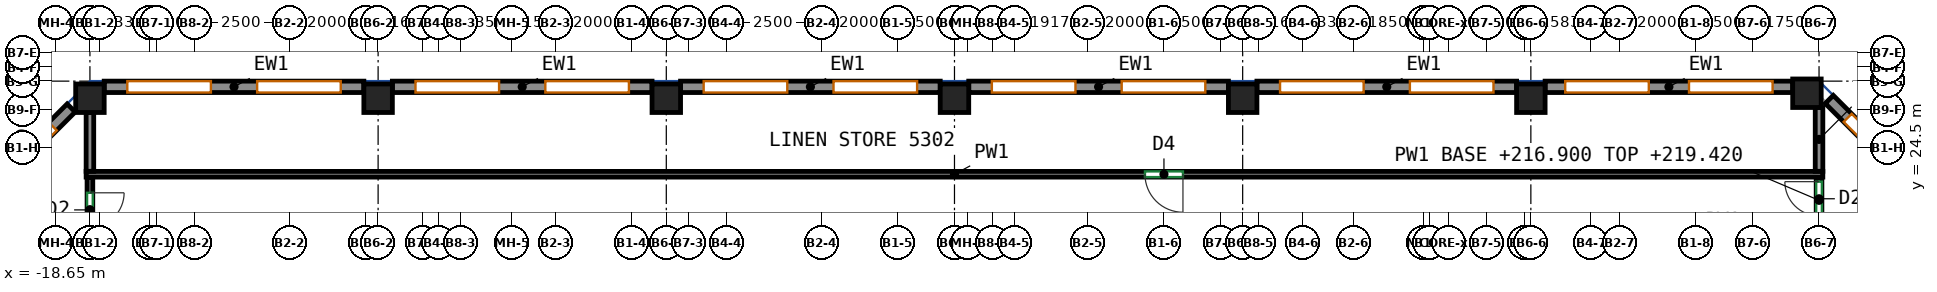
"""IFC4 building model, lengths in metres.
Left out: names, types, materials, properties, quantities, classifications, styles, units other than length and angle.
Written with IfcOpenShell. Run it as: python <this file> out.ifc"""

import sys

from ifc_helpers import new_model, si_unit, direction, frame, frame_2d, origin, origin_2d, place, context, subcontext, project, spatial, rectangle, extrude, source, transform, mapped, element, fill, save


model = new_model("IFC4")
c1 = context("Model", 3, precision=1e-05, world=origin(), true_north=direction((0.0, 1.0)))
c2 = subcontext(c1, "Body", "Model", "MODEL_VIEW")
j1 = project(units=[si_unit("LENGTHUNIT", "METRE"), si_unit("PLANEANGLEUNIT", "RADIAN")], contexts=[c1])
p1 = place(None, origin())
s1 = spatial("IfcSite", under=j1, at=p1, CompositionType="ELEMENT")
p2 = place(p1, origin())
s2 = spatial("IfcBuilding", under=s1, at=p2, CompositionType="ELEMENT")
p3 = place(p2, frame((0.0, 0.0, 216.9)))
s3 = spatial("IfcBuildingStorey", under=s2, at=p3, CompositionType="ELEMENT", Elevation=216.9)
m1 = source(origin(), c2, "Body", "SweptSolid", [
    extrude(rectangle(XDim=0.75, YDim=0.75, at=origin_2d()), origin(), (0.0, 0.0, 1.0), 3.12),
])
for number, where, z_axis, x_axis in (
    (1, (-17.75, 25.8, 0.0), (0.0, 0.0, 1.0), (1.0, 0.0, 0.0)),
    (2, (-10.167, 25.8, 0.0), (0.0, 0.0, 1.0), (1.0, 0.0, 0.0)),
    (3, (-2.583, 25.8, 0.0), (0.0, 0.0, 1.0), (1.0, 0.0, 0.0)),
    (4, (5.0, 25.8, 0.0), (0.0, 0.0, 1.0), (1.0, 0.0, 0.0)),
    (5, (12.583, 25.8, 0.0), (0.0, 0.0, 1.0), (1.0, 0.0, 0.0)),
    (6, (20.167, 25.8, 0.0), (0.0, 0.0, 1.0), (1.0, 0.0, 0.0)),
    (7, (27.432, 25.932, 0.0), (0.0, 0.0, 1.0), (1.0, 0.0, 0.0)),
):
    element("IfcColumn", number, at=place(p3, frame(where, z_axis=z_axis, x_axis=x_axis)), inside=s3, PredefinedType="COLUMN", context=c2, shape_type="MappedRepresentation", body=[
        mapped(m1, transform((0.0, 0.0, 0.0))),
    ])
m2 = source(origin(), c2, "Body", "SweptSolid", [
    extrude(rectangle(XDim=3.571, YDim=0.3, at=frame_2d((1.786, 0.0))), origin(), (0.0, 0.0, 1.0), 3.12),
])
p4 = place(p3, frame((30.544, 23.244, 0.0), z_axis=(0.0, 0.0, 1.0), x_axis=(-0.707140964879, 0.707072595841, 0.0)))
e8 = element("IfcWall", 8, at=p4, inside=s3, PredefinedType="SOLIDWALL", context=c2, shape_type="MappedRepresentation", body=[
    mapped(m2, transform((0.0, 0.0, 0.0))),
])
p5 = place(p4, frame((0.686, 0.0, 0.85)))
e9 = element("IfcOpeningElement", 9, at=p5, cuts=e8, PredefinedType="OPENING", context=c2, shape_type="SweptSolid", body=[
    extrude(rectangle(XDim=2.2, YDim=1.95, at=frame_2d((1.1, 0.975))), frame((0.0, 0.16, 0.0), z_axis=(0.0, -1.0, 0.0), x_axis=(1.0, 0.0, 0.0)), (0.0, 0.0, 1.0), 0.32),
])
m3 = source(origin(), c2, "Body", "SweptSolid", [
    extrude(rectangle(XDim=6.515, YDim=0.3, at=frame_2d((3.258, 0.0))), origin(), (0.0, 0.0, 1.0), 3.12),
])
p6 = place(p3, frame((27.057, 26.1, 0.0), z_axis=(0.0, 0.0, 1.0), x_axis=(-1.0, 0.0, 0.0)))
e10 = element("IfcWall", 10, at=p6, inside=s3, PredefinedType="SOLIDWALL", context=c2, shape_type="MappedRepresentation", body=[
    mapped(m3, transform((0.0, 0.0, 0.0))),
])
p7 = place(p6, frame((0.529, 0.0, 0.85)))
e11 = element("IfcOpeningElement", 11, at=p7, cuts=e10, PredefinedType="OPENING", context=c2, shape_type="SweptSolid", body=[
    extrude(rectangle(XDim=2.2, YDim=1.95, at=frame_2d((1.1, 0.975))), frame((0.0, 0.16, 0.0), z_axis=(0.0, -1.0, 0.0), x_axis=(1.0, 0.0, 0.0)), (0.0, 0.0, 1.0), 0.32),
])
p8 = place(p6, frame((3.786, 0.0, 0.85)))
e12 = element("IfcOpeningElement", 12, at=p8, cuts=e10, PredefinedType="OPENING", context=c2, shape_type="SweptSolid", body=[
    extrude(rectangle(XDim=2.2, YDim=1.95, at=frame_2d((1.1, 0.975))), frame((0.0, 0.16, 0.0), z_axis=(0.0, -1.0, 0.0), x_axis=(1.0, 0.0, 0.0)), (0.0, 0.0, 1.0), 0.32),
])
m4 = source(origin(), c2, "Body", "SweptSolid", [
    extrude(rectangle(XDim=6.833, YDim=0.3, at=frame_2d((3.417, 0.0))), origin(), (0.0, 0.0, 1.0), 3.12),
])
p9 = place(p3, frame((19.792, 26.1, 0.0), z_axis=(0.0, 0.0, 1.0), x_axis=(-1.0, 0.0, 0.0)))
e13 = element("IfcWall", 13, at=p9, inside=s3, PredefinedType="SOLIDWALL", context=c2, shape_type="MappedRepresentation", body=[
    mapped(m4, transform((0.0, 0.0, 0.0))),
])
p10 = place(p9, frame((0.608, 0.0, 0.85)))
e14 = element("IfcOpeningElement", 14, at=p10, cuts=e13, PredefinedType="OPENING", context=c2, shape_type="SweptSolid", body=[
    extrude(rectangle(XDim=2.2, YDim=1.95, at=frame_2d((1.1, 0.975))), frame((0.0, 0.16, 0.0), z_axis=(0.0, -1.0, 0.0), x_axis=(1.0, 0.0, 0.0)), (0.0, 0.0, 1.0), 0.32),
])
p11 = place(p9, frame((4.025, 0.0, 0.85)))
e15 = element("IfcOpeningElement", 15, at=p11, cuts=e13, PredefinedType="OPENING", context=c2, shape_type="SweptSolid", body=[
    extrude(rectangle(XDim=2.2, YDim=1.95, at=frame_2d((1.1, 0.975))), frame((0.0, 0.16, 0.0), z_axis=(0.0, -1.0, 0.0), x_axis=(1.0, 0.0, 0.0)), (0.0, 0.0, 1.0), 0.32),
])
m5 = source(origin(), c2, "Body", "SweptSolid", [
    extrude(rectangle(XDim=6.833, YDim=0.3, at=frame_2d((3.417, 0.0))), origin(), (0.0, 0.0, 1.0), 3.12),
])
p12 = place(p3, frame((12.208, 26.1, 0.0), z_axis=(0.0, 0.0, 1.0), x_axis=(-1.0, 0.0, 0.0)))
e16 = element("IfcWall", 16, at=p12, inside=s3, PredefinedType="SOLIDWALL", context=c2, shape_type="MappedRepresentation", body=[
    mapped(m5, transform((0.0, 0.0, 0.0))),
])
p13 = place(p12, frame((0.608, 0.0, 0.85)))
e17 = element("IfcOpeningElement", 17, at=p13, cuts=e16, PredefinedType="OPENING", context=c2, shape_type="SweptSolid", body=[
    extrude(rectangle(XDim=2.2, YDim=1.95, at=frame_2d((1.1, 0.975))), frame((0.0, 0.16, 0.0), z_axis=(0.0, -1.0, 0.0), x_axis=(1.0, 0.0, 0.0)), (0.0, 0.0, 1.0), 0.32),
])
p14 = place(p12, frame((4.025, 0.0, 0.85)))
e18 = element("IfcOpeningElement", 18, at=p14, cuts=e16, PredefinedType="OPENING", context=c2, shape_type="SweptSolid", body=[
    extrude(rectangle(XDim=2.2, YDim=1.95, at=frame_2d((1.1, 0.975))), frame((0.0, 0.16, 0.0), z_axis=(0.0, -1.0, 0.0), x_axis=(1.0, 0.0, 0.0)), (0.0, 0.0, 1.0), 0.32),
])
p15 = place(p3, frame((4.625, 26.1, 0.0), z_axis=(0.0, 0.0, 1.0), x_axis=(-1.0, 0.0, 0.0)))
e19 = element("IfcWall", 19, at=p15, inside=s3, PredefinedType="SOLIDWALL", context=c2, shape_type="MappedRepresentation", body=[
    mapped(m5, transform((0.0, 0.0, 0.0))),
])
p16 = place(p15, frame((0.608, 0.0, 0.85)))
e20 = element("IfcOpeningElement", 20, at=p16, cuts=e19, PredefinedType="OPENING", context=c2, shape_type="SweptSolid", body=[
    extrude(rectangle(XDim=2.2, YDim=1.95, at=frame_2d((1.1, 0.975))), frame((0.0, 0.16, 0.0), z_axis=(0.0, -1.0, 0.0), x_axis=(1.0, 0.0, 0.0)), (0.0, 0.0, 1.0), 0.32),
])
p17 = place(p15, frame((4.025, 0.0, 0.85)))
e21 = element("IfcOpeningElement", 21, at=p17, cuts=e19, PredefinedType="OPENING", context=c2, shape_type="SweptSolid", body=[
    extrude(rectangle(XDim=2.2, YDim=1.95, at=frame_2d((1.1, 0.975))), frame((0.0, 0.16, 0.0), z_axis=(0.0, -1.0, 0.0), x_axis=(1.0, 0.0, 0.0)), (0.0, 0.0, 1.0), 0.32),
])
p18 = place(p3, frame((-2.958, 26.1, 0.0), z_axis=(0.0, 0.0, 1.0), x_axis=(-1.0, 0.0, 0.0)))
e22 = element("IfcWall", 22, at=p18, inside=s3, PredefinedType="SOLIDWALL", context=c2, shape_type="MappedRepresentation", body=[
    mapped(m4, transform((0.0, 0.0, 0.0))),
])
p19 = place(p18, frame((0.608, 0.0, 0.85)))
e23 = element("IfcOpeningElement", 23, at=p19, cuts=e22, PredefinedType="OPENING", context=c2, shape_type="SweptSolid", body=[
    extrude(rectangle(XDim=2.2, YDim=1.95, at=frame_2d((1.1, 0.975))), frame((0.0, 0.16, 0.0), z_axis=(0.0, -1.0, 0.0), x_axis=(1.0, 0.0, 0.0)), (0.0, 0.0, 1.0), 0.32),
])
p20 = place(p18, frame((4.025, 0.0, 0.85)))
e24 = element("IfcOpeningElement", 24, at=p20, cuts=e22, PredefinedType="OPENING", context=c2, shape_type="SweptSolid", body=[
    extrude(rectangle(XDim=2.2, YDim=1.95, at=frame_2d((1.1, 0.975))), frame((0.0, 0.16, 0.0), z_axis=(0.0, -1.0, 0.0), x_axis=(1.0, 0.0, 0.0)), (0.0, 0.0, 1.0), 0.32),
])
p21 = place(p3, frame((-10.542, 26.1, 0.0), z_axis=(0.0, 0.0, 1.0), x_axis=(-1.0, 0.0, 0.0)))
e25 = element("IfcWall", 25, at=p21, inside=s3, PredefinedType="SOLIDWALL", context=c2, shape_type="MappedRepresentation", body=[
    mapped(m5, transform((0.0, 0.0, 0.0))),
])
p22 = place(p21, frame((0.608, 0.0, 0.85)))
e26 = element("IfcOpeningElement", 26, at=p22, cuts=e25, PredefinedType="OPENING", context=c2, shape_type="SweptSolid", body=[
    extrude(rectangle(XDim=2.2, YDim=1.95, at=frame_2d((1.1, 0.975))), frame((0.0, 0.16, 0.0), z_axis=(0.0, -1.0, 0.0), x_axis=(1.0, 0.0, 0.0)), (0.0, 0.0, 1.0), 0.32),
])
p23 = place(p21, frame((4.025, 0.0, 0.85)))
e27 = element("IfcOpeningElement", 27, at=p23, cuts=e25, PredefinedType="OPENING", context=c2, shape_type="SweptSolid", body=[
    extrude(rectangle(XDim=2.2, YDim=1.95, at=frame_2d((1.1, 0.975))), frame((0.0, 0.16, 0.0), z_axis=(0.0, -1.0, 0.0), x_axis=(1.0, 0.0, 0.0)), (0.0, 0.0, 1.0), 0.32),
])
p24 = place(p3, frame((-18.244, 25.544, 0.0), z_axis=(0.0, 0.0, 1.0), x_axis=(-0.707072595841, -0.707140964879, 0.0)))
e28 = element("IfcWall", 28, at=p24, inside=s3, PredefinedType="SOLIDWALL", context=c2, shape_type="MappedRepresentation", body=[
    mapped(m2, transform((0.0, 0.0, 0.0))),
])
p25 = place(p24, frame((0.686, 0.0, 0.85)))
e29 = element("IfcOpeningElement", 29, at=p25, cuts=e28, PredefinedType="OPENING", context=c2, shape_type="SweptSolid", body=[
    extrude(rectangle(XDim=2.2, YDim=1.95, at=frame_2d((1.1, 0.975))), frame((0.0, 0.16, 0.0), z_axis=(0.0, -1.0, 0.0), x_axis=(1.0, 0.0, 0.0)), (0.0, 0.0, 1.0), 0.32),
])
p26 = place(p3, frame((-17.75, 23.725, 0.0), z_axis=(0.0, 0.0, 1.0), x_axis=(0.0, -1.0, 0.0)))
e30 = element("IfcWall", 30, at=p26, inside=s3, PredefinedType="PARTITIONING", context=c2, shape_type="SweptSolid", body=[
    extrude(rectangle(XDim=1.725, YDim=0.15, at=frame_2d((0.863, 0.0))), origin(), (0.0, 0.0, 1.0), 3.12),
])
p27 = place(p26, frame((0.413, 0.0, 0.0)))
e31 = element("IfcOpeningElement", 31, at=p27, cuts=e30, PredefinedType="OPENING", context=c2, shape_type="SweptSolid", body=[
    extrude(rectangle(XDim=0.9, YDim=2.1, at=frame_2d((0.45, 1.05))), frame((0.0, 0.085, 0.0), z_axis=(0.0, -1.0, 0.0), x_axis=(1.0, 0.0, 0.0)), (0.0, 0.0, 1.0), 0.17),
])
p28 = place(p3, frame((27.75, 22.503, 0.0), z_axis=(0.0, 0.0, 1.0), x_axis=(0.0, 1.0, 0.0)))
e32 = element("IfcWall", 32, at=p28, inside=s3, PredefinedType="PARTITIONING", context=c2, shape_type="SweptSolid", body=[
    extrude(rectangle(XDim=1.222, YDim=0.15, at=frame_2d((0.611, 0.0))), origin(), (0.0, 0.0, 1.0), 2.52),
])
p29 = place(p28, frame((0.202, 0.0, 0.0)))
e33 = element("IfcOpeningElement", 33, at=p29, cuts=e32, PredefinedType="OPENING", context=c2, shape_type="SweptSolid", body=[
    extrude(rectangle(XDim=0.9, YDim=2.1, at=frame_2d((0.45, 1.05))), frame((0.0, 0.085, 0.0), z_axis=(0.0, -1.0, 0.0), x_axis=(1.0, 0.0, 0.0)), (0.0, 0.0, 1.0), 0.17),
])
p30 = place(p3, frame((27.85, 23.8, 0.0), z_axis=(0.0, 0.0, 1.0), x_axis=(-1.0, 0.0, 0.0)))
e34 = element("IfcWall", 34, at=p30, inside=s3, PredefinedType="PARTITIONING", context=c2, shape_type="SweptSolid", body=[
    extrude(rectangle(XDim=45.7, YDim=0.15, at=frame_2d((22.85, 0.0))), origin(), (0.0, 0.0, 1.0), 3.12),
])
p31 = place(p30, frame((16.838, 0.0, 0.0)))
e35 = element("IfcOpeningElement", 35, at=p31, cuts=e34, PredefinedType="OPENING", context=c2, shape_type="SweptSolid", body=[
    extrude(rectangle(XDim=1.0, YDim=2.1, at=frame_2d((0.5, 1.05))), frame((0.0, 0.085, 0.0), z_axis=(0.0, -1.0, 0.0), x_axis=(1.0, 0.0, 0.0)), (0.0, 0.0, 1.0), 0.17),
])
p32 = place(p3, frame((-17.75, 23.877, 0.0), z_axis=(0.0, 0.0, 1.0), x_axis=(0.0, 1.0, 0.0)))
e36 = element("IfcWall", 36, at=p32, inside=s3, PredefinedType="PARTITIONING", context=c2, shape_type="SweptSolid", body=[
    extrude(rectangle(XDim=1.548, YDim=0.2, at=frame_2d((0.774, 0.0))), origin(), (0.0, 0.0, 1.0), 3.12),
])
p33 = place(p3, frame((27.75, 25.557, 0.0), z_axis=(0.0, 0.0, 1.0), x_axis=(0.0, -1.0, 0.0)))
e37 = element("IfcWall", 37, at=p33, inside=s3, PredefinedType="PARTITIONING", context=c2, shape_type="SweptSolid", body=[
    extrude(rectangle(XDim=1.68, YDim=0.2, at=frame_2d((0.84, 0.0))), origin(), (0.0, 0.0, 1.0), 2.52),
])
p34 = place(p5, origin())
e38 = element("IfcWindow", 38, at=p34, inside=s3, PartitioningType="SINGLE_PANEL", PredefinedType="WINDOW", context=c2, shape_type="SweptSolid", body=[
    extrude(rectangle(XDim=2.2, YDim=1.95, at=frame_2d((1.1, 0.975))), frame((0.0, 0.03, 0.0), z_axis=(0.0, -1.0, 0.0), x_axis=(1.0, 0.0, 0.0)), (0.0, 0.0, 1.0), 0.06),
])
fill(e9, e38)
p35 = place(p7, origin())
e39 = element("IfcWindow", 39, at=p35, inside=s3, PartitioningType="SINGLE_PANEL", PredefinedType="WINDOW", context=c2, shape_type="SweptSolid", body=[
    extrude(rectangle(XDim=2.2, YDim=1.95, at=frame_2d((1.1, 0.975))), frame((0.0, 0.03, 0.0), z_axis=(0.0, -1.0, 0.0), x_axis=(1.0, 0.0, 0.0)), (0.0, 0.0, 1.0), 0.06),
])
fill(e11, e39)
p36 = place(p8, origin())
e40 = element("IfcWindow", 40, at=p36, inside=s3, PartitioningType="SINGLE_PANEL", PredefinedType="WINDOW", context=c2, shape_type="SweptSolid", body=[
    extrude(rectangle(XDim=2.2, YDim=1.95, at=frame_2d((1.1, 0.975))), frame((0.0, 0.03, 0.0), z_axis=(0.0, -1.0, 0.0), x_axis=(1.0, 0.0, 0.0)), (0.0, 0.0, 1.0), 0.06),
])
fill(e12, e40)
p37 = place(p10, origin())
e41 = element("IfcWindow", 41, at=p37, inside=s3, PartitioningType="SINGLE_PANEL", PredefinedType="WINDOW", context=c2, shape_type="SweptSolid", body=[
    extrude(rectangle(XDim=2.2, YDim=1.95, at=frame_2d((1.1, 0.975))), frame((0.0, 0.03, 0.0), z_axis=(0.0, -1.0, 0.0), x_axis=(1.0, 0.0, 0.0)), (0.0, 0.0, 1.0), 0.06),
])
fill(e14, e41)
p38 = place(p11, origin())
e42 = element("IfcWindow", 42, at=p38, inside=s3, PartitioningType="SINGLE_PANEL", PredefinedType="WINDOW", context=c2, shape_type="SweptSolid", body=[
    extrude(rectangle(XDim=2.2, YDim=1.95, at=frame_2d((1.1, 0.975))), frame((0.0, 0.03, 0.0), z_axis=(0.0, -1.0, 0.0), x_axis=(1.0, 0.0, 0.0)), (0.0, 0.0, 1.0), 0.06),
])
fill(e15, e42)
p39 = place(p13, origin())
e43 = element("IfcWindow", 43, at=p39, inside=s3, PartitioningType="SINGLE_PANEL", PredefinedType="WINDOW", context=c2, shape_type="SweptSolid", body=[
    extrude(rectangle(XDim=2.2, YDim=1.95, at=frame_2d((1.1, 0.975))), frame((0.0, 0.03, 0.0), z_axis=(0.0, -1.0, 0.0), x_axis=(1.0, 0.0, 0.0)), (0.0, 0.0, 1.0), 0.06),
])
fill(e17, e43)
p40 = place(p14, origin())
e44 = element("IfcWindow", 44, at=p40, inside=s3, PartitioningType="SINGLE_PANEL", PredefinedType="WINDOW", context=c2, shape_type="SweptSolid", body=[
    extrude(rectangle(XDim=2.2, YDim=1.95, at=frame_2d((1.1, 0.975))), frame((0.0, 0.03, 0.0), z_axis=(0.0, -1.0, 0.0), x_axis=(1.0, 0.0, 0.0)), (0.0, 0.0, 1.0), 0.06),
])
fill(e18, e44)
p41 = place(p16, origin())
e45 = element("IfcWindow", 45, at=p41, inside=s3, PartitioningType="SINGLE_PANEL", PredefinedType="WINDOW", context=c2, shape_type="SweptSolid", body=[
    extrude(rectangle(XDim=2.2, YDim=1.95, at=frame_2d((1.1, 0.975))), frame((0.0, 0.03, 0.0), z_axis=(0.0, -1.0, 0.0), x_axis=(1.0, 0.0, 0.0)), (0.0, 0.0, 1.0), 0.06),
])
fill(e20, e45)
p42 = place(p17, origin())
e46 = element("IfcWindow", 46, at=p42, inside=s3, PartitioningType="SINGLE_PANEL", PredefinedType="WINDOW", context=c2, shape_type="SweptSolid", body=[
    extrude(rectangle(XDim=2.2, YDim=1.95, at=frame_2d((1.1, 0.975))), frame((0.0, 0.03, 0.0), z_axis=(0.0, -1.0, 0.0), x_axis=(1.0, 0.0, 0.0)), (0.0, 0.0, 1.0), 0.06),
])
fill(e21, e46)
p43 = place(p19, origin())
e47 = element("IfcWindow", 47, at=p43, inside=s3, PartitioningType="SINGLE_PANEL", PredefinedType="WINDOW", context=c2, shape_type="SweptSolid", body=[
    extrude(rectangle(XDim=2.2, YDim=1.95, at=frame_2d((1.1, 0.975))), frame((0.0, 0.03, 0.0), z_axis=(0.0, -1.0, 0.0), x_axis=(1.0, 0.0, 0.0)), (0.0, 0.0, 1.0), 0.06),
])
fill(e23, e47)
p44 = place(p20, origin())
e48 = element("IfcWindow", 48, at=p44, inside=s3, PartitioningType="SINGLE_PANEL", PredefinedType="WINDOW", context=c2, shape_type="SweptSolid", body=[
    extrude(rectangle(XDim=2.2, YDim=1.95, at=frame_2d((1.1, 0.975))), frame((0.0, 0.03, 0.0), z_axis=(0.0, -1.0, 0.0), x_axis=(1.0, 0.0, 0.0)), (0.0, 0.0, 1.0), 0.06),
])
fill(e24, e48)
p45 = place(p22, origin())
e49 = element("IfcWindow", 49, at=p45, inside=s3, PartitioningType="SINGLE_PANEL", PredefinedType="WINDOW", context=c2, shape_type="SweptSolid", body=[
    extrude(rectangle(XDim=2.2, YDim=1.95, at=frame_2d((1.1, 0.975))), frame((0.0, 0.03, 0.0), z_axis=(0.0, -1.0, 0.0), x_axis=(1.0, 0.0, 0.0)), (0.0, 0.0, 1.0), 0.06),
])
fill(e26, e49)
p46 = place(p23, origin())
e50 = element("IfcWindow", 50, at=p46, inside=s3, PartitioningType="SINGLE_PANEL", PredefinedType="WINDOW", context=c2, shape_type="SweptSolid", body=[
    extrude(rectangle(XDim=2.2, YDim=1.95, at=frame_2d((1.1, 0.975))), frame((0.0, 0.03, 0.0), z_axis=(0.0, -1.0, 0.0), x_axis=(1.0, 0.0, 0.0)), (0.0, 0.0, 1.0), 0.06),
])
fill(e27, e50)
p47 = place(p25, origin())
e51 = element("IfcWindow", 51, at=p47, inside=s3, PartitioningType="SINGLE_PANEL", PredefinedType="WINDOW", context=c2, shape_type="SweptSolid", body=[
    extrude(rectangle(XDim=2.2, YDim=1.95, at=frame_2d((1.1, 0.975))), frame((0.0, 0.03, 0.0), z_axis=(0.0, -1.0, 0.0), x_axis=(1.0, 0.0, 0.0)), (0.0, 0.0, 1.0), 0.06),
])
fill(e29, e51)
p48 = place(p27, origin())
e52 = element("IfcDoor", 52, at=p48, inside=s3, OperationType="SINGLE_SWING_LEFT", PredefinedType="DOOR", context=c2, shape_type="SweptSolid", body=[
    extrude(rectangle(XDim=0.9, YDim=2.1, at=frame_2d((0.45, 1.05))), frame((0.0, 0.025, 0.0), z_axis=(0.0, -1.0, 0.0), x_axis=(1.0, 0.0, 0.0)), (0.0, 0.0, 1.0), 0.05),
])
fill(e31, e52)
p49 = place(p29, origin())
e53 = element("IfcDoor", 53, at=p49, inside=s3, OperationType="SINGLE_SWING_RIGHT", PredefinedType="DOOR", context=c2, shape_type="SweptSolid", body=[
    extrude(rectangle(XDim=0.9, YDim=2.1, at=frame_2d((0.45, 1.05))), frame((0.0, 0.025, 0.0), z_axis=(0.0, -1.0, 0.0), x_axis=(1.0, 0.0, 0.0)), (0.0, 0.0, 1.0), 0.05),
])
fill(e33, e53)
p50 = place(p31, origin())
e54 = element("IfcDoor", 54, at=p50, inside=s3, OperationType="SINGLE_SWING_LEFT", PredefinedType="DOOR", context=c2, shape_type="SweptSolid", body=[
    extrude(rectangle(XDim=1.0, YDim=2.1, at=frame_2d((0.5, 1.05))), frame((0.0, 0.025, 0.0), z_axis=(0.0, -1.0, 0.0), x_axis=(1.0, 0.0, 0.0)), (0.0, 0.0, 1.0), 0.05),
])
fill(e35, e54)
save(model, sys.argv[1])
